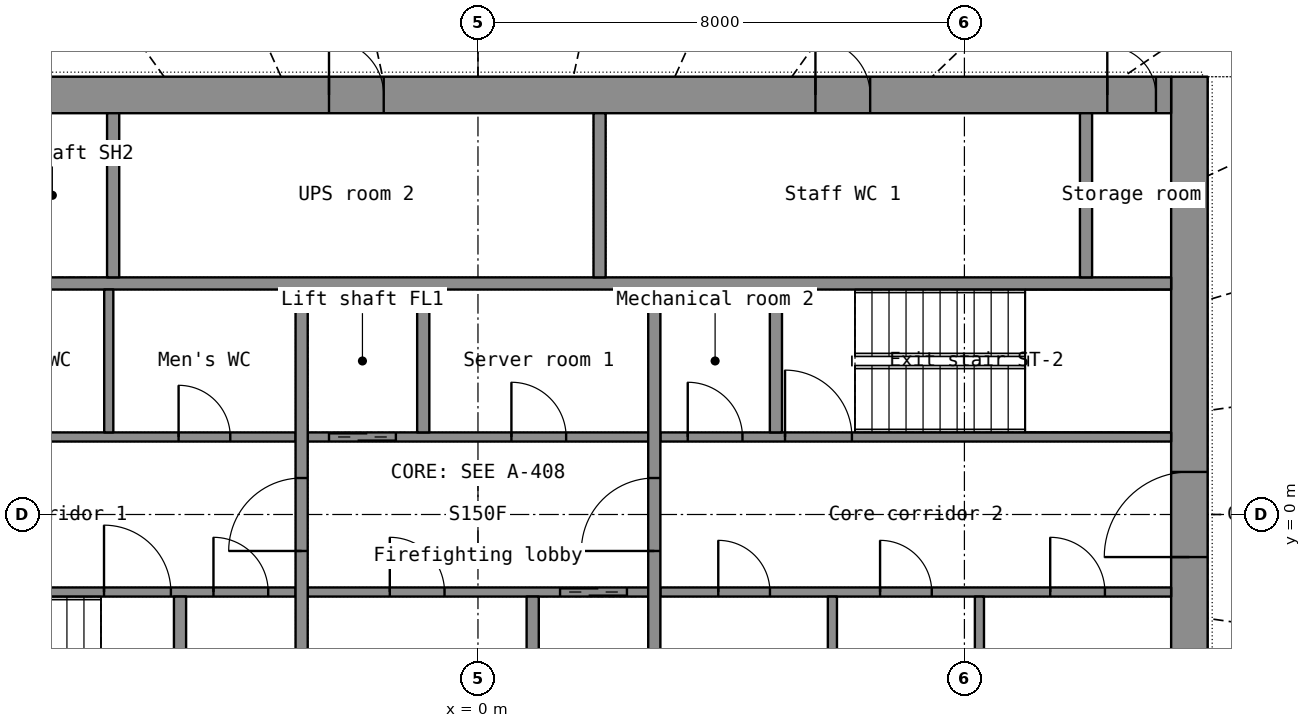
"""IFC4 building model, lengths in metres.
Left out: names, types, materials, properties, quantities, classifications, styles, units other than length and angle.
Written with IfcOpenShell. Run it as: python <this file> out.ifc"""

import sys

from ifc_helpers import new_model, si_unit, direction, frame, frame_2d, origin, place, context, subcontext, project, spatial, rectangle, extrude, element, fill, save


model = new_model("IFC4")
c1 = context("Model", 3, precision=1e-05, world=origin(), true_north=direction((0.0, 1.0)))
c2 = subcontext(c1, "Body", "Model", "MODEL_VIEW")
j1 = project(units=[si_unit("LENGTHUNIT", "METRE"), si_unit("PLANEANGLEUNIT", "RADIAN")], contexts=[c1])
p1 = place(None, origin())
s1 = spatial("IfcSite", under=j1, at=p1, CompositionType="ELEMENT")
p2 = place(p1, origin())
s2 = spatial("IfcBuilding", under=s1, at=p2, CompositionType="ELEMENT")
p3 = place(p2, frame((0.0, 0.0, 37.1)))
s3 = spatial("IfcBuildingStorey", under=s2, at=p3, CompositionType="ELEMENT", Elevation=37.1)
p4 = place(p3, frame((11.7, -7.2, 0.0), z_axis=(0.0, 0.0, 1.0), x_axis=(0.0, 1.0, 0.0)))
e1 = element("IfcWall", 1, at=p4, inside=s3, PredefinedType="SHEAR", context=c2, shape_type="SweptSolid", body=[
    extrude(rectangle(XDim=14.4, YDim=0.6, at=frame_2d((7.2, 0.0))), origin(), (0.0, 0.0, 1.0), 3.3),
])
p5 = place(p4, frame((6.5, 0.0, 0.0)))
e2 = element("IfcOpeningElement", 2, at=p5, cuts=e1, PredefinedType="OPENING", context=c2, shape_type="SweptSolid", body=[
    extrude(rectangle(XDim=1.4, YDim=2.2, at=frame_2d((0.7, 1.1))), frame((0.0, 0.31, 0.0), z_axis=(0.0, -1.0, 0.0), x_axis=(1.0, 0.0, 0.0)), (0.0, 0.0, 1.0), 0.62),
])
p6 = place(p3, frame((-11.4, 6.9, 0.0), z_axis=(0.0, 0.0, 1.0), x_axis=(1.0, 0.0, 0.0)))
e3 = element("IfcWall", 3, at=p6, inside=s3, PredefinedType="SHEAR", context=c2, shape_type="SweptSolid", body=[
    extrude(rectangle(XDim=22.8, YDim=0.6, at=frame_2d((11.4, 0.0))), origin(), (0.0, 0.0, 1.0), 3.3),
])
p7 = place(p6, frame((1.85, 0.0, 0.0)))
e4 = element("IfcOpeningElement", 4, at=p7, cuts=e3, PredefinedType="OPENING", context=c2, shape_type="SweptSolid", body=[
    extrude(rectangle(XDim=1.1, YDim=2.2, at=frame_2d((0.55, 1.1))), frame((0.0, 0.31, 0.0), z_axis=(0.0, -1.0, 0.0), x_axis=(1.0, 0.0, 0.0)), (0.0, 0.0, 1.0), 0.62),
])
p8 = place(p6, frame((8.95, 0.0, 0.0)))
e5 = element("IfcOpeningElement", 5, at=p8, cuts=e3, PredefinedType="OPENING", context=c2, shape_type="SweptSolid", body=[
    extrude(rectangle(XDim=0.9, YDim=2.1, at=frame_2d((0.45, 1.05))), frame((0.0, 0.31, 0.0), z_axis=(0.0, -1.0, 0.0), x_axis=(1.0, 0.0, 0.0)), (0.0, 0.0, 1.0), 0.62),
])
p9 = place(p6, frame((16.95, 0.0, 0.0)))
e6 = element("IfcOpeningElement", 6, at=p9, cuts=e3, PredefinedType="OPENING", context=c2, shape_type="SweptSolid", body=[
    extrude(rectangle(XDim=0.9, YDim=2.1, at=frame_2d((0.45, 1.05))), frame((0.0, 0.31, 0.0), z_axis=(0.0, -1.0, 0.0), x_axis=(1.0, 0.0, 0.0)), (0.0, 0.0, 1.0), 0.62),
])
p10 = place(p6, frame((0.25, 0.0, 0.0)))
e7 = element("IfcOpeningElement", 7, at=p10, cuts=e3, PredefinedType="OPENING", context=c2, shape_type="SweptSolid", body=[
    extrude(rectangle(XDim=0.8, YDim=2.05, at=frame_2d((0.4, 1.025))), frame((0.0, 0.31, 0.0), z_axis=(0.0, -1.0, 0.0), x_axis=(1.0, 0.0, 0.0)), (0.0, 0.0, 1.0), 0.62),
])
p11 = place(p6, frame((21.75, 0.0, 0.0)))
e8 = element("IfcOpeningElement", 8, at=p11, cuts=e3, PredefinedType="OPENING", context=c2, shape_type="SweptSolid", body=[
    extrude(rectangle(XDim=0.8, YDim=2.05, at=frame_2d((0.4, 1.025))), frame((0.0, 0.31, 0.0), z_axis=(0.0, -1.0, 0.0), x_axis=(1.0, 0.0, 0.0)), (0.0, 0.0, 1.0), 0.62),
])
p12 = place(p3, frame((-11.4, 3.8, 0.0), z_axis=(0.0, 0.0, 1.0), x_axis=(1.0, 0.0, 0.0)))
e9 = element("IfcWall", 9, at=p12, inside=s3, PredefinedType="SHEAR", context=c2, shape_type="SweptSolid", body=[
    extrude(rectangle(XDim=22.8, YDim=0.2, at=frame_2d((11.4, 0.0))), origin(), (0.0, 0.0, 1.0), 3.3),
])
for number, where, z_axis, x_axis in (
    (10, (-6.0, 3.9, 0.0), (0.0, 0.0, 1.0), (0.0, 1.0, 0.0)),
    (11, (10.0, 3.9, 0.0), (0.0, 0.0, 1.0), (0.0, 1.0, 0.0)),
):
    element("IfcWall", number, at=place(p3, frame(where, z_axis=z_axis, x_axis=x_axis)), inside=s3, PredefinedType="SHEAR", context=c2, shape_type="SweptSolid", body=[
        extrude(rectangle(XDim=2.7, YDim=0.2, at=frame_2d((1.35, 0.0))), origin(), (0.0, 0.0, 1.0), 3.3),
    ])
p13 = place(p3, frame((2.0, 3.9, 0.0), z_axis=(0.0, 0.0, 1.0), x_axis=(0.0, 1.0, 0.0)))
e12 = element("IfcWall", 12, at=p13, inside=s3, PredefinedType="PARTITIONING", context=c2, shape_type="SweptSolid", body=[
    extrude(rectangle(XDim=2.7, YDim=0.2, at=frame_2d((1.35, 0.0))), origin(), (0.0, 0.0, 1.0), 3.3),
])
p14 = place(p3, frame((-11.4, -1.275, 0.0), z_axis=(0.0, 0.0, 1.0), x_axis=(1.0, 0.0, 0.0)))
e13 = element("IfcWall", 13, at=p14, inside=s3, PredefinedType="SHEAR", context=c2, shape_type="SweptSolid", body=[
    extrude(rectangle(XDim=8.4, YDim=0.15, at=frame_2d((4.2, 0.0))), origin(), (0.0, 0.0, 1.0), 3.3),
])
p15 = place(p14, frame((5.25, 0.0, 0.0)))
e14 = element("IfcOpeningElement", 14, at=p15, cuts=e13, PredefinedType="OPENING", context=c2, shape_type="SweptSolid", body=[
    extrude(rectangle(XDim=1.1, YDim=2.15, at=frame_2d((0.55, 1.075))), frame((0.0, 0.085, 0.0), z_axis=(0.0, -1.0, 0.0), x_axis=(1.0, 0.0, 0.0)), (0.0, 0.0, 1.0), 0.17),
])
p16 = place(p14, frame((7.05, 0.0, 0.0)))
e15 = element("IfcOpeningElement", 15, at=p16, cuts=e13, PredefinedType="OPENING", context=c2, shape_type="SweptSolid", body=[
    extrude(rectangle(XDim=0.9, YDim=2.1, at=frame_2d((0.45, 1.05))), frame((0.0, 0.085, 0.0), z_axis=(0.0, -1.0, 0.0), x_axis=(1.0, 0.0, 0.0)), (0.0, 0.0, 1.0), 0.17),
])
p17 = place(p3, frame((-2.8, -1.275, 0.0), z_axis=(0.0, 0.0, 1.0), x_axis=(1.0, 0.0, 0.0)))
e16 = element("IfcWall", 16, at=p17, inside=s3, PredefinedType="SHEAR", context=c2, shape_type="SweptSolid", body=[
    extrude(rectangle(XDim=5.6, YDim=0.15, at=frame_2d((2.8, 0.0))), origin(), (0.0, 0.0, 1.0), 3.3),
])
p18 = place(p17, frame((4.15, 0.0, 0.0)))
e17 = element("IfcOpeningElement", 17, at=p18, cuts=e16, PredefinedType="OPENING", context=c2, shape_type="SweptSolid", body=[
    extrude(rectangle(XDim=1.1, YDim=2.2, at=frame_2d((0.55, 1.1))), frame((0.0, 0.085, 0.0), z_axis=(0.0, -1.0, 0.0), x_axis=(1.0, 0.0, 0.0)), (0.0, 0.0, 1.0), 0.17),
])
p19 = place(p17, frame((1.35, 0.0, 0.0)))
e18 = element("IfcOpeningElement", 18, at=p19, cuts=e16, PredefinedType="OPENING", context=c2, shape_type="SweptSolid", body=[
    extrude(rectangle(XDim=0.9, YDim=2.1, at=frame_2d((0.45, 1.05))), frame((0.0, 0.085, 0.0), z_axis=(0.0, -1.0, 0.0), x_axis=(1.0, 0.0, 0.0)), (0.0, 0.0, 1.0), 0.17),
])
p20 = place(p3, frame((3.0, -1.275, 0.0), z_axis=(0.0, 0.0, 1.0), x_axis=(1.0, 0.0, 0.0)))
e19 = element("IfcWall", 19, at=p20, inside=s3, PredefinedType="PARTITIONING", context=c2, shape_type="SweptSolid", body=[
    extrude(rectangle(XDim=8.4, YDim=0.15, at=frame_2d((4.2, 0.0))), origin(), (0.0, 0.0, 1.0), 3.3),
])
p21 = place(p20, frame((0.952, 0.0, 0.0)))
e20 = element("IfcOpeningElement", 20, at=p21, cuts=e19, PredefinedType="OPENING", context=c2, shape_type="SweptSolid", body=[
    extrude(rectangle(XDim=0.85, YDim=2.1, at=frame_2d((0.425, 1.05))), frame((0.0, 0.085, 0.0), z_axis=(0.0, -1.0, 0.0), x_axis=(1.0, 0.0, 0.0)), (0.0, 0.0, 1.0), 0.17),
])
p22 = place(p20, frame((3.613, 0.0, 0.0)))
e21 = element("IfcOpeningElement", 21, at=p22, cuts=e19, PredefinedType="OPENING", context=c2, shape_type="SweptSolid", body=[
    extrude(rectangle(XDim=0.85, YDim=2.1, at=frame_2d((0.425, 1.05))), frame((0.0, 0.085, 0.0), z_axis=(0.0, -1.0, 0.0), x_axis=(1.0, 0.0, 0.0)), (0.0, 0.0, 1.0), 0.17),
])
p23 = place(p20, frame((6.411, 0.0, 0.0)))
e22 = element("IfcOpeningElement", 22, at=p23, cuts=e19, PredefinedType="OPENING", context=c2, shape_type="SweptSolid", body=[
    extrude(rectangle(XDim=0.9, YDim=2.1, at=frame_2d((0.45, 1.05))), frame((0.0, 0.085, 0.0), z_axis=(0.0, -1.0, 0.0), x_axis=(1.0, 0.0, 0.0)), (0.0, 0.0, 1.0), 0.17),
])
p24 = place(p3, frame((-11.4, 1.275, 0.0), z_axis=(0.0, 0.0, 1.0), x_axis=(1.0, 0.0, 0.0)))
e23 = element("IfcWall", 23, at=p24, inside=s3, PredefinedType="PARTITIONING", context=c2, shape_type="SweptSolid", body=[
    extrude(rectangle(XDim=8.4, YDim=0.15, at=frame_2d((4.2, 0.0))), origin(), (0.0, 0.0, 1.0), 3.3),
])
p25 = place(p24, frame((0.603, 0.0, 0.0)))
e24 = element("IfcOpeningElement", 24, at=p25, cuts=e23, PredefinedType="OPENING", context=c2, shape_type="SweptSolid", body=[
    extrude(rectangle(XDim=0.9, YDim=2.1, at=frame_2d((0.45, 1.05))), frame((0.0, 0.085, 0.0), z_axis=(0.0, -1.0, 0.0), x_axis=(1.0, 0.0, 0.0)), (0.0, 0.0, 1.0), 0.17),
])
p26 = place(p24, frame((3.33, 0.0, 0.0)))
e25 = element("IfcOpeningElement", 25, at=p26, cuts=e23, PredefinedType="OPENING", context=c2, shape_type="SweptSolid", body=[
    extrude(rectangle(XDim=0.85, YDim=2.1, at=frame_2d((0.425, 1.05))), frame((0.0, 0.085, 0.0), z_axis=(0.0, -1.0, 0.0), x_axis=(1.0, 0.0, 0.0)), (0.0, 0.0, 1.0), 0.17),
])
p27 = place(p24, frame((6.477, 0.0, 0.0)))
e26 = element("IfcOpeningElement", 26, at=p27, cuts=e23, PredefinedType="OPENING", context=c2, shape_type="SweptSolid", body=[
    extrude(rectangle(XDim=0.85, YDim=2.1, at=frame_2d((0.425, 1.05))), frame((0.0, 0.085, 0.0), z_axis=(0.0, -1.0, 0.0), x_axis=(1.0, 0.0, 0.0)), (0.0, 0.0, 1.0), 0.17),
])
p28 = place(p3, frame((-2.8, 1.275, 0.0), z_axis=(0.0, 0.0, 1.0), x_axis=(1.0, 0.0, 0.0)))
e27 = element("IfcWall", 27, at=p28, inside=s3, PredefinedType="SHEAR", context=c2, shape_type="SweptSolid", body=[
    extrude(rectangle(XDim=5.6, YDim=0.15, at=frame_2d((2.8, 0.0))), origin(), (0.0, 0.0, 1.0), 3.3),
])
p29 = place(p28, frame((0.35, 0.0, 0.0)))
e28 = element("IfcOpeningElement", 28, at=p29, cuts=e27, PredefinedType="OPENING", context=c2, shape_type="SweptSolid", body=[
    extrude(rectangle(XDim=1.1, YDim=2.2, at=frame_2d((0.55, 1.1))), frame((0.0, 0.085, 0.0), z_axis=(0.0, -1.0, 0.0), x_axis=(1.0, 0.0, 0.0)), (0.0, 0.0, 1.0), 0.17),
])
p30 = place(p28, frame((3.35, 0.0, 0.0)))
e29 = element("IfcOpeningElement", 29, at=p30, cuts=e27, PredefinedType="OPENING", context=c2, shape_type="SweptSolid", body=[
    extrude(rectangle(XDim=0.9, YDim=2.1, at=frame_2d((0.45, 1.05))), frame((0.0, 0.085, 0.0), z_axis=(0.0, -1.0, 0.0), x_axis=(1.0, 0.0, 0.0)), (0.0, 0.0, 1.0), 0.17),
])
p31 = place(p3, frame((3.0, 1.275, 0.0), z_axis=(0.0, 0.0, 1.0), x_axis=(1.0, 0.0, 0.0)))
e30 = element("IfcWall", 30, at=p31, inside=s3, PredefinedType="SHEAR", context=c2, shape_type="SweptSolid", body=[
    extrude(rectangle(XDim=8.4, YDim=0.15, at=frame_2d((4.2, 0.0))), origin(), (0.0, 0.0, 1.0), 3.3),
])
p32 = place(p31, frame((2.05, 0.0, 0.0)))
e31 = element("IfcOpeningElement", 31, at=p32, cuts=e30, PredefinedType="OPENING", context=c2, shape_type="SweptSolid", body=[
    extrude(rectangle(XDim=1.1, YDim=2.15, at=frame_2d((0.55, 1.075))), frame((0.0, 0.085, 0.0), z_axis=(0.0, -1.0, 0.0), x_axis=(1.0, 0.0, 0.0)), (0.0, 0.0, 1.0), 0.17),
])
p33 = place(p31, frame((0.45, 0.0, 0.0)))
e32 = element("IfcOpeningElement", 32, at=p33, cuts=e30, PredefinedType="OPENING", context=c2, shape_type="SweptSolid", body=[
    extrude(rectangle(XDim=0.9, YDim=2.1, at=frame_2d((0.45, 1.05))), frame((0.0, 0.085, 0.0), z_axis=(0.0, -1.0, 0.0), x_axis=(1.0, 0.0, 0.0)), (0.0, 0.0, 1.0), 0.17),
])
p34 = place(p3, frame((-2.9, -3.7, 0.0), z_axis=(0.0, 0.0, 1.0), x_axis=(0.0, 1.0, 0.0)))
e33 = element("IfcWall", 33, at=p34, inside=s3, PredefinedType="SHEAR", context=c2, shape_type="SweptSolid", body=[
    extrude(rectangle(XDim=7.4, YDim=0.2, at=frame_2d((3.7, 0.0))), origin(), (0.0, 0.0, 1.0), 3.3),
])
p35 = place(p34, frame((3.1, 0.0, 0.0)))
e34 = element("IfcOpeningElement", 34, at=p35, cuts=e33, PredefinedType="OPENING", context=c2, shape_type="SweptSolid", body=[
    extrude(rectangle(XDim=1.2, YDim=2.2, at=frame_2d((0.6, 1.1))), frame((0.0, 0.11, 0.0), z_axis=(0.0, -1.0, 0.0), x_axis=(1.0, 0.0, 0.0)), (0.0, 0.0, 1.0), 0.22),
])
p36 = place(p3, frame((2.9, -3.7, 0.0), z_axis=(0.0, 0.0, 1.0), x_axis=(0.0, 1.0, 0.0)))
e35 = element("IfcWall", 35, at=p36, inside=s3, PredefinedType="SHEAR", context=c2, shape_type="SweptSolid", body=[
    extrude(rectangle(XDim=7.4, YDim=0.2, at=frame_2d((3.7, 0.0))), origin(), (0.0, 0.0, 1.0), 3.3),
])
p37 = place(p36, frame((3.1, 0.0, 0.0)))
e36 = element("IfcOpeningElement", 36, at=p37, cuts=e35, PredefinedType="OPENING", context=c2, shape_type="SweptSolid", body=[
    extrude(rectangle(XDim=1.2, YDim=2.2, at=frame_2d((0.6, 1.1))), frame((0.0, 0.11, 0.0), z_axis=(0.0, -1.0, 0.0), x_axis=(1.0, 0.0, 0.0)), (0.0, 0.0, 1.0), 0.22),
])
for number, where, z_axis, x_axis in (
    (37, (-0.9, 1.35, 0.0), (0.0, 0.0, 1.0), (0.0, 1.0, 0.0)),
    (38, (0.9, -3.7, 0.0), (0.0, 0.0, 1.0), (0.0, 1.0, 0.0)),
    (39, (-4.9, -3.7, 0.0), (0.0, 0.0, 1.0), (0.0, 1.0, 0.0)),
    (40, (4.9, 1.35, 0.0), (0.0, 0.0, 1.0), (0.0, 1.0, 0.0)),
):
    element("IfcWall", number, at=place(p3, frame(where, z_axis=z_axis, x_axis=x_axis)), inside=s3, PredefinedType="SHEAR", context=c2, shape_type="SweptSolid", body=[
        extrude(rectangle(XDim=2.35, YDim=0.2, at=frame_2d((1.175, 0.0))), origin(), (0.0, 0.0, 1.0), 3.3),
    ])
for number, where, z_axis, x_axis in (
    (41, (-6.072, 1.35, 0.0), (0.0, 0.0, 1.0), (0.0, 1.0, 0.0)),
    (42, (5.829, -3.7, 0.0), (0.0, 0.0, 1.0), (0.0, 1.0, 0.0)),
    (43, (8.247, -3.7, 0.0), (0.0, 0.0, 1.0), (0.0, 1.0, 0.0)),
):
    element("IfcWall", number, at=place(p3, frame(where, z_axis=z_axis, x_axis=x_axis)), inside=s3, PredefinedType="PARTITIONING", context=c2, shape_type="SweptSolid", body=[
        extrude(rectangle(XDim=2.35, YDim=0.15, at=frame_2d((1.175, 0.0))), origin(), (0.0, 0.0, 1.0), 3.3),
    ])
p38 = place(p8, origin())
e44 = element("IfcDoor", 44, at=p38, inside=s3, OperationType="SINGLE_SWING_LEFT", PredefinedType="DOOR", context=c2, shape_type="SweptSolid", body=[
    extrude(rectangle(XDim=0.9, YDim=2.1, at=frame_2d((0.45, 1.05))), frame((0.0, 0.025, 0.0), z_axis=(0.0, -1.0, 0.0), x_axis=(1.0, 0.0, 0.0)), (0.0, 0.0, 1.0), 0.05),
])
fill(e5, e44)
p39 = place(p9, origin())
e45 = element("IfcDoor", 45, at=p39, inside=s3, OperationType="SINGLE_SWING_LEFT", PredefinedType="DOOR", context=c2, shape_type="SweptSolid", body=[
    extrude(rectangle(XDim=0.9, YDim=2.1, at=frame_2d((0.45, 1.05))), frame((0.0, 0.025, 0.0), z_axis=(0.0, -1.0, 0.0), x_axis=(1.0, 0.0, 0.0)), (0.0, 0.0, 1.0), 0.05),
])
fill(e6, e45)
p40 = place(p11, origin())
e46 = element("IfcDoor", 46, at=p40, inside=s3, OperationType="SINGLE_SWING_LEFT", PredefinedType="DOOR", context=c2, shape_type="SweptSolid", body=[
    extrude(rectangle(XDim=0.8, YDim=2.05, at=frame_2d((0.4, 1.025))), frame((0.0, 0.025, 0.0), z_axis=(0.0, -1.0, 0.0), x_axis=(1.0, 0.0, 0.0)), (0.0, 0.0, 1.0), 0.05),
])
fill(e8, e46)
p41 = place(p5, origin())
e47 = element("IfcDoor", 47, at=p41, inside=s3, OperationType="DOUBLE_DOOR_SINGLE_SWING", PredefinedType="DOOR", context=c2, shape_type="SweptSolid", body=[
    extrude(rectangle(XDim=1.4, YDim=2.2, at=frame_2d((0.7, 1.1))), frame((0.0, 0.025, 0.0), z_axis=(0.0, -1.0, 0.0), x_axis=(1.0, 0.0, 0.0)), (0.0, 0.0, 1.0), 0.05),
])
fill(e2, e47)
p42 = place(p35, origin())
e48 = element("IfcDoor", 48, at=p42, inside=s3, OperationType="SINGLE_SWING_LEFT", PredefinedType="DOOR", context=c2, shape_type="SweptSolid", body=[
    extrude(rectangle(XDim=1.2, YDim=2.2, at=frame_2d((0.6, 1.1))), frame((0.0, 0.025, 0.0), z_axis=(0.0, -1.0, 0.0), x_axis=(1.0, 0.0, 0.0)), (0.0, 0.0, 1.0), 0.05),
])
fill(e34, e48)
p43 = place(p37, origin())
e49 = element("IfcDoor", 49, at=p43, inside=s3, OperationType="SINGLE_SWING_LEFT", PredefinedType="DOOR", context=c2, shape_type="SweptSolid", body=[
    extrude(rectangle(XDim=1.2, YDim=2.2, at=frame_2d((0.6, 1.1))), frame((0.0, 0.025, 0.0), z_axis=(0.0, -1.0, 0.0), x_axis=(1.0, 0.0, 0.0)), (0.0, 0.0, 1.0), 0.05),
])
fill(e36, e49)
p44 = place(p29, origin())
e50 = element("IfcDoor", 50, at=p44, inside=s3, OperationType="DOUBLE_DOOR_SLIDING", PredefinedType="DOOR", context=c2, shape_type="SweptSolid", body=[
    extrude(rectangle(XDim=1.1, YDim=2.2, at=frame_2d((0.55, 1.1))), frame((0.0, 0.025, 0.0), z_axis=(0.0, -1.0, 0.0), x_axis=(1.0, 0.0, 0.0)), (0.0, 0.0, 1.0), 0.05),
])
fill(e28, e50)
p45 = place(p18, origin())
e51 = element("IfcDoor", 51, at=p45, inside=s3, OperationType="DOUBLE_DOOR_SLIDING", PredefinedType="DOOR", context=c2, shape_type="SweptSolid", body=[
    extrude(rectangle(XDim=1.1, YDim=2.2, at=frame_2d((0.55, 1.1))), frame((0.0, 0.025, 0.0), z_axis=(0.0, -1.0, 0.0), x_axis=(1.0, 0.0, 0.0)), (0.0, 0.0, 1.0), 0.05),
])
fill(e17, e51)
p46 = place(p15, origin())
e52 = element("IfcDoor", 52, at=p46, inside=s3, OperationType="SINGLE_SWING_LEFT", PredefinedType="DOOR", context=c2, shape_type="SweptSolid", body=[
    extrude(rectangle(XDim=1.1, YDim=2.15, at=frame_2d((0.55, 1.075))), frame((0.0, 0.025, 0.0), z_axis=(0.0, -1.0, 0.0), x_axis=(1.0, 0.0, 0.0)), (0.0, 0.0, 1.0), 0.05),
])
fill(e14, e52)
p47 = place(p32, origin())
e53 = element("IfcDoor", 53, at=p47, inside=s3, OperationType="SINGLE_SWING_LEFT", PredefinedType="DOOR", context=c2, shape_type="SweptSolid", body=[
    extrude(rectangle(XDim=1.1, YDim=2.15, at=frame_2d((0.55, 1.075))), frame((0.0, 0.025, 0.0), z_axis=(0.0, -1.0, 0.0), x_axis=(1.0, 0.0, 0.0)), (0.0, 0.0, 1.0), 0.05),
])
fill(e31, e53)
p48 = place(p27, origin())
e54 = element("IfcDoor", 54, at=p48, inside=s3, OperationType="SINGLE_SWING_LEFT", PredefinedType="DOOR", context=c2, shape_type="SweptSolid", body=[
    extrude(rectangle(XDim=0.85, YDim=2.1, at=frame_2d((0.425, 1.05))), frame((0.0, 0.025, 0.0), z_axis=(0.0, -1.0, 0.0), x_axis=(1.0, 0.0, 0.0)), (0.0, 0.0, 1.0), 0.05),
])
fill(e26, e54)
p49 = place(p21, origin())
e55 = element("IfcDoor", 55, at=p49, inside=s3, OperationType="SINGLE_SWING_LEFT", PredefinedType="DOOR", context=c2, shape_type="SweptSolid", body=[
    extrude(rectangle(XDim=0.85, YDim=2.1, at=frame_2d((0.425, 1.05))), frame((0.0, 0.025, 0.0), z_axis=(0.0, -1.0, 0.0), x_axis=(1.0, 0.0, 0.0)), (0.0, 0.0, 1.0), 0.05),
])
fill(e20, e55)
p50 = place(p22, origin())
e56 = element("IfcDoor", 56, at=p50, inside=s3, OperationType="SINGLE_SWING_LEFT", PredefinedType="DOOR", context=c2, shape_type="SweptSolid", body=[
    extrude(rectangle(XDim=0.85, YDim=2.1, at=frame_2d((0.425, 1.05))), frame((0.0, 0.025, 0.0), z_axis=(0.0, -1.0, 0.0), x_axis=(1.0, 0.0, 0.0)), (0.0, 0.0, 1.0), 0.05),
])
fill(e21, e56)
p51 = place(p23, origin())
e57 = element("IfcDoor", 57, at=p51, inside=s3, OperationType="SINGLE_SWING_LEFT", PredefinedType="DOOR", context=c2, shape_type="SweptSolid", body=[
    extrude(rectangle(XDim=0.9, YDim=2.1, at=frame_2d((0.45, 1.05))), frame((0.0, 0.025, 0.0), z_axis=(0.0, -1.0, 0.0), x_axis=(1.0, 0.0, 0.0)), (0.0, 0.0, 1.0), 0.05),
])
fill(e22, e57)
p52 = place(p30, origin())
e58 = element("IfcDoor", 58, at=p52, inside=s3, OperationType="SINGLE_SWING_LEFT", PredefinedType="DOOR", context=c2, shape_type="SweptSolid", body=[
    extrude(rectangle(XDim=0.9, YDim=2.1, at=frame_2d((0.45, 1.05))), frame((0.0, 0.025, 0.0), z_axis=(0.0, -1.0, 0.0), x_axis=(1.0, 0.0, 0.0)), (0.0, 0.0, 1.0), 0.05),
])
fill(e29, e58)
p53 = place(p19, origin())
e59 = element("IfcDoor", 59, at=p53, inside=s3, OperationType="SINGLE_SWING_LEFT", PredefinedType="DOOR", context=c2, shape_type="SweptSolid", body=[
    extrude(rectangle(XDim=0.9, YDim=2.1, at=frame_2d((0.45, 1.05))), frame((0.0, 0.025, 0.0), z_axis=(0.0, -1.0, 0.0), x_axis=(1.0, 0.0, 0.0)), (0.0, 0.0, 1.0), 0.05),
])
fill(e18, e59)
p54 = place(p33, origin())
e60 = element("IfcDoor", 60, at=p54, inside=s3, OperationType="SINGLE_SWING_LEFT", PredefinedType="DOOR", context=c2, shape_type="SweptSolid", body=[
    extrude(rectangle(XDim=0.9, YDim=2.1, at=frame_2d((0.45, 1.05))), frame((0.0, 0.025, 0.0), z_axis=(0.0, -1.0, 0.0), x_axis=(1.0, 0.0, 0.0)), (0.0, 0.0, 1.0), 0.05),
])
fill(e32, e60)
p55 = place(p16, origin())
e61 = element("IfcDoor", 61, at=p55, inside=s3, OperationType="SINGLE_SWING_LEFT", PredefinedType="DOOR", context=c2, shape_type="SweptSolid", body=[
    extrude(rectangle(XDim=0.9, YDim=2.1, at=frame_2d((0.45, 1.05))), frame((0.0, 0.025, 0.0), z_axis=(0.0, -1.0, 0.0), x_axis=(1.0, 0.0, 0.0)), (0.0, 0.0, 1.0), 0.05),
])
fill(e15, e61)
save(model, sys.argv[1])
